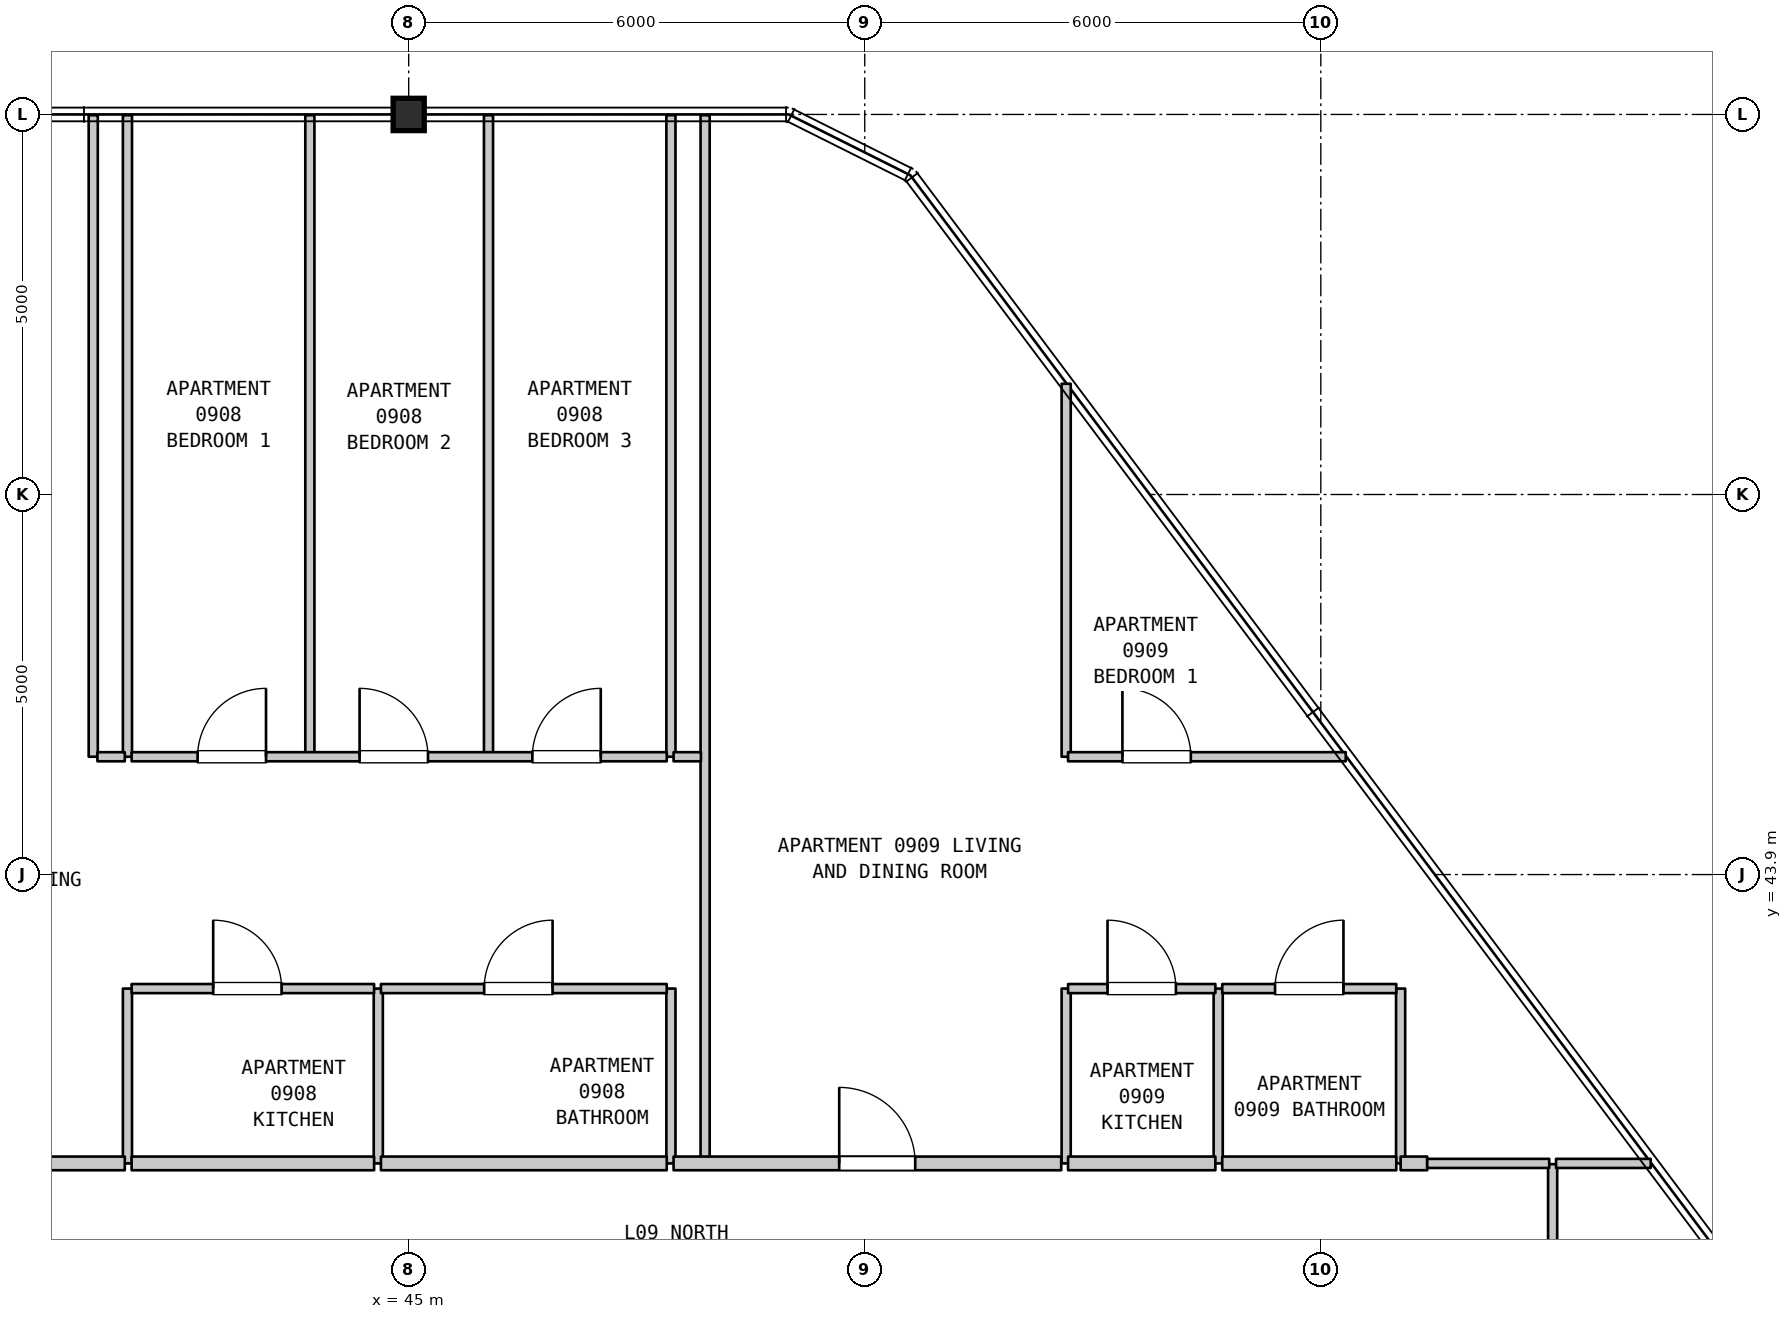
"""IFC4 building model, lengths in metres.
Left out: names, types, materials, properties, quantities, classifications, styles, units other than length and angle.
Written with IfcOpenShell. Run it as: python <this file> out.ifc"""

import sys

from ifc_helpers import new_model, si_unit, direction, frame, frame_2d, origin, origin_2d, place, context, subcontext, project, spatial, rectangle, i_section, extrude, element, fill, save


model = new_model("IFC4")
c1 = context("Model", 3, precision=1e-05, world=origin(), true_north=direction((0.0, 1.0)))
c2 = subcontext(c1, "Body", "Model", "MODEL_VIEW")
j1 = project(units=[si_unit("LENGTHUNIT", "METRE"), si_unit("PLANEANGLEUNIT", "RADIAN")], contexts=[c1])
p1 = place(None, origin())
s1 = spatial("IfcSite", under=j1, at=p1, CompositionType="ELEMENT")
p2 = place(p1, origin())
s2 = spatial("IfcBuilding", under=s1, at=p2, CompositionType="ELEMENT")
p3 = place(p2, frame((0.0, 0.0, 42.5)))
s3 = spatial("IfcBuildingStorey", under=s2, at=p3, CompositionType="ELEMENT", Elevation=42.5)
p4 = place(p3, frame((45.0, 53.9, 0.0), z_axis=(0.0, 0.0, 1.0), x_axis=(1.0, 0.0, 0.0)))
e1 = element("IfcColumn", 1, at=p4, inside=s3, PredefinedType="COLUMN", context=c2, shape_type="SweptSolid", body=[
    extrude(i_section(OverallWidth=0.409, OverallDepth=0.425, WebThickness=0.032, FlangeThickness=0.052, FilletRadius=0.015, at=origin_2d()), origin(), (0.0, 0.0, 1.0), 3.7),
])
p5 = place(p3, frame((40.85, 45.45, 0.0), z_axis=(0.0, 0.0, 1.0), x_axis=(0.0, 1.0, 0.0)))
e2 = element("IfcWall", 2, at=p5, inside=s3, PredefinedType="PARTITIONING", context=c2, shape_type="SweptSolid", body=[
    extrude(rectangle(XDim=8.44, YDim=0.12, at=frame_2d((4.22, 0.0))), origin(), (0.0, 0.0, 1.0), 3.385),
])
p6 = place(p3, frame((41.3, 40.1, 0.0), z_axis=(0.0, 0.0, 1.0), x_axis=(0.0, 1.0, 0.0)))
e3 = element("IfcWall", 3, at=p6, inside=s3, PredefinedType="PARTITIONING", context=c2, shape_type="SweptSolid", body=[
    extrude(rectangle(XDim=2.3, YDim=0.12, at=frame_2d((1.15, 0.0))), origin(), (0.0, 0.0, 1.0), 3.385),
])
for number, where, z_axis, x_axis in (
    (4, (41.3, 45.45, 0.0), (0.0, 0.0, 1.0), (0.0, 1.0, 0.0)),
    (5, (43.7, 45.45, 0.0), (0.0, 0.0, 1.0), (0.0, 1.0, 0.0)),
):
    element("IfcWall", number, at=place(p3, frame(where, z_axis=z_axis, x_axis=x_axis)), inside=s3, PredefinedType="PARTITIONING", context=c2, shape_type="SweptSolid", body=[
        extrude(rectangle(XDim=8.44, YDim=0.12, at=frame_2d((4.22, 0.0))), origin(), (0.0, 0.0, 1.0), 3.385),
    ])
p7 = place(p3, frame((44.6, 40.1, 0.0), z_axis=(0.0, 0.0, 1.0), x_axis=(0.0, 1.0, 0.0)))
e6 = element("IfcWall", 6, at=p7, inside=s3, PredefinedType="PARTITIONING", context=c2, shape_type="SweptSolid", body=[
    extrude(rectangle(XDim=2.3, YDim=0.12, at=frame_2d((1.15, 0.0))), origin(), (0.0, 0.0, 1.0), 3.385),
])
p8 = place(p3, frame((46.05, 45.45, 0.0), z_axis=(0.0, 0.0, 1.0), x_axis=(0.0, 1.0, 0.0)))
e7 = element("IfcWall", 7, at=p8, inside=s3, PredefinedType="PARTITIONING", context=c2, shape_type="SweptSolid", body=[
    extrude(rectangle(XDim=8.44, YDim=0.12, at=frame_2d((4.22, 0.0))), origin(), (0.0, 0.0, 1.0), 3.385),
])
p9 = place(p3, frame((48.45, 40.1, 0.0), z_axis=(0.0, 0.0, 1.0), x_axis=(0.0, 1.0, 0.0)))
e8 = element("IfcWall", 8, at=p9, inside=s3, PredefinedType="PARTITIONING", context=c2, shape_type="SweptSolid", body=[
    extrude(rectangle(XDim=2.3, YDim=0.12, at=frame_2d((1.15, 0.0))), origin(), (0.0, 0.0, 1.0), 3.385),
])
p10 = place(p3, frame((48.45, 45.45, 0.0), z_axis=(0.0, 0.0, 1.0), x_axis=(0.0, 1.0, 0.0)))
e9 = element("IfcWall", 9, at=p10, inside=s3, PredefinedType="PARTITIONING", context=c2, shape_type="SweptSolid", body=[
    extrude(rectangle(XDim=8.44, YDim=0.12, at=frame_2d((4.22, 0.0))), origin(), (0.0, 0.0, 1.0), 3.385),
])
p11 = place(p3, frame((48.9, 40.1, 0.0), z_axis=(0.0, 0.0, 1.0), x_axis=(0.0, 1.0, 0.0)))
e10 = element("IfcWall", 10, at=p11, inside=s3, PredefinedType="PARTITIONING", context=c2, shape_type="SweptSolid", body=[
    extrude(rectangle(XDim=13.79, YDim=0.12, at=frame_2d((6.895, 0.0))), origin(), (0.0, 0.0, 1.0), 3.385),
])
p12 = place(p3, frame((53.65, 40.1, 0.0), z_axis=(0.0, 0.0, 1.0), x_axis=(0.0, 1.0, 0.0)))
e11 = element("IfcWall", 11, at=p12, inside=s3, PredefinedType="PARTITIONING", context=c2, shape_type="SweptSolid", body=[
    extrude(rectangle(XDim=2.3, YDim=0.12, at=frame_2d((1.15, 0.0))), origin(), (0.0, 0.0, 1.0), 3.385),
])
p13 = place(p3, frame((53.65, 45.45, 0.0), z_axis=(0.0, 0.0, 1.0), x_axis=(0.0, 1.0, 0.0)))
e12 = element("IfcWall", 12, at=p13, inside=s3, PredefinedType="PARTITIONING", context=c2, shape_type="SweptSolid", body=[
    extrude(rectangle(XDim=4.907, YDim=0.12, at=frame_2d((2.454, 0.0))), origin(), (0.0, 0.0, 1.0), 3.385),
])
for number, where, z_axis, x_axis in (
    (13, (55.65, 40.1, 0.0), (0.0, 0.0, 1.0), (0.0, 1.0, 0.0)),
    (14, (58.05, 40.1, 0.0), (0.0, 0.0, 1.0), (0.0, 1.0, 0.0)),
):
    element("IfcWall", number, at=place(p3, frame(where, z_axis=z_axis, x_axis=x_axis)), inside=s3, PredefinedType="PARTITIONING", context=c2, shape_type="SweptSolid", body=[
        extrude(rectangle(XDim=2.3, YDim=0.12, at=frame_2d((1.15, 0.0))), origin(), (0.0, 0.0, 1.0), 3.385),
    ])
p14 = place(p3, frame((60.05, 37.89, 0.0), z_axis=(0.0, 0.0, 1.0), x_axis=(0.0, 1.0, 0.0)))
e15 = element("IfcWall", 15, at=p14, inside=s3, PredefinedType="PARTITIONING", context=c2, shape_type="SweptSolid", body=[
    extrude(rectangle(XDim=2.2, YDim=0.12, at=frame_2d((1.1, 0.0))), origin(), (0.0, 0.0, 1.0), 3.385),
])
p15 = place(p3, frame((36.125, 40.1, 0.0), z_axis=(0.0, 0.0, 1.0), x_axis=(1.0, 0.0, 0.0)))
e16 = element("IfcWall", 16, at=p15, inside=s3, PredefinedType="STANDARD", context=c2, shape_type="SweptSolid", body=[
    extrude(rectangle(XDim=5.14, YDim=0.18, at=frame_2d((2.57, 0.0))), origin(), (0.0, 0.0, 1.0), 3.385),
])
p16 = place(p15, frame((2.198, 0.0, 0.0)))
e17 = element("IfcOpeningElement", 17, at=p16, cuts=e16, PredefinedType="OPENING", context=c2, shape_type="SweptSolid", body=[
    extrude(rectangle(XDim=1.0, YDim=2.15, at=frame_2d((0.5, 1.075))), frame((0.0, 0.1, 0.0), z_axis=(0.0, -1.0, 0.0), x_axis=(1.0, 0.0, 0.0)), (0.0, 0.0, 1.0), 0.2),
])
p17 = place(p3, frame((41.355, 40.1, 0.0), z_axis=(0.0, 0.0, 1.0), x_axis=(1.0, 0.0, 0.0)))
e18 = element("IfcWall", 18, at=p17, inside=s3, PredefinedType="STANDARD", context=c2, shape_type="SweptSolid", body=[
    extrude(rectangle(XDim=3.19, YDim=0.18, at=frame_2d((1.595, 0.0))), origin(), (0.0, 0.0, 1.0), 3.385),
])
p18 = place(p3, frame((44.635, 40.1, 0.0), z_axis=(0.0, 0.0, 1.0), x_axis=(1.0, 0.0, 0.0)))
e19 = element("IfcWall", 19, at=p18, inside=s3, PredefinedType="STANDARD", context=c2, shape_type="SweptSolid", body=[
    extrude(rectangle(XDim=3.76, YDim=0.18, at=frame_2d((1.88, 0.0))), origin(), (0.0, 0.0, 1.0), 3.385),
])
p19 = place(p3, frame((48.485, 40.1, 0.0), z_axis=(0.0, 0.0, 1.0), x_axis=(1.0, 0.0, 0.0)))
e20 = element("IfcWall", 20, at=p19, inside=s3, PredefinedType="STANDARD", context=c2, shape_type="SweptSolid", body=[
    extrude(rectangle(XDim=5.1, YDim=0.18, at=frame_2d((2.55, 0.0))), origin(), (0.0, 0.0, 1.0), 3.385),
])
p20 = place(p19, frame((2.179, 0.0, 0.0)))
e21 = element("IfcOpeningElement", 21, at=p20, cuts=e20, PredefinedType="OPENING", context=c2, shape_type="SweptSolid", body=[
    extrude(rectangle(XDim=1.0, YDim=2.15, at=frame_2d((0.5, 1.075))), frame((0.0, 0.1, 0.0), z_axis=(0.0, -1.0, 0.0), x_axis=(1.0, 0.0, 0.0)), (0.0, 0.0, 1.0), 0.2),
])
p21 = place(p3, frame((53.675, 40.1, 0.0), z_axis=(0.0, 0.0, 1.0), x_axis=(1.0, 0.0, 0.0)))
e22 = element("IfcWall", 22, at=p21, inside=s3, PredefinedType="STANDARD", context=c2, shape_type="SweptSolid", body=[
    extrude(rectangle(XDim=1.938, YDim=0.18, at=frame_2d((0.969, 0.0))), origin(), (0.0, 0.0, 1.0), 3.385),
])
p22 = place(p3, frame((55.703, 40.1, 0.0), z_axis=(0.0, 0.0, 1.0), x_axis=(1.0, 0.0, 0.0)))
e23 = element("IfcWall", 23, at=p22, inside=s3, PredefinedType="STANDARD", context=c2, shape_type="SweptSolid", body=[
    extrude(rectangle(XDim=2.29, YDim=0.18, at=frame_2d((1.145, 0.0))), origin(), (0.0, 0.0, 1.0), 3.385),
])
p23 = place(p3, frame((58.05, 40.1, 0.0), z_axis=(0.0, 0.0, 1.0), x_axis=(1.0, 0.0, 0.0)))
e24 = element("IfcWall", 24, at=p23, inside=s3, PredefinedType="STANDARD", context=c2, shape_type="SweptSolid", body=[
    extrude(rectangle(XDim=0.35, YDim=0.18, at=frame_2d((0.175, 0.0))), origin(), (0.0, 0.0, 1.0), 3.385),
])
p24 = place(p3, frame((58.4, 40.1, 0.0), z_axis=(0.0, 0.0, 1.0), x_axis=(1.0, 0.0, 0.0)))
e25 = element("IfcWall", 25, at=p24, inside=s3, PredefinedType="PARTITIONING", context=c2, shape_type="SweptSolid", body=[
    extrude(rectangle(XDim=1.605, YDim=0.12, at=frame_2d((0.802, 0.0))), origin(), (0.0, 0.0, 1.0), 3.385),
])
p25 = place(p3, frame((60.095, 40.1, 0.0), z_axis=(0.0, 0.0, 1.0), x_axis=(1.0, 0.0, 0.0)))
e26 = element("IfcWall", 26, at=p25, inside=s3, PredefinedType="PARTITIONING", context=c2, shape_type="SweptSolid", body=[
    extrude(rectangle(XDim=1.245, YDim=0.12, at=frame_2d((0.623, 0.0))), origin(), (0.0, 0.0, 1.0), 3.385),
])
p26 = place(p3, frame((41.355, 42.4, 0.0), z_axis=(0.0, 0.0, 1.0), x_axis=(1.0, 0.0, 0.0)))
e27 = element("IfcWall", 27, at=p26, inside=s3, PredefinedType="PARTITIONING", context=c2, shape_type="SweptSolid", body=[
    extrude(rectangle(XDim=3.19, YDim=0.12, at=frame_2d((1.595, 0.0))), origin(), (0.0, 0.0, 1.0), 3.385),
])
p27 = place(p26, frame((1.073, 0.0, 0.0)))
e28 = element("IfcOpeningElement", 28, at=p27, cuts=e27, PredefinedType="OPENING", context=c2, shape_type="SweptSolid", body=[
    extrude(rectangle(XDim=0.9, YDim=2.15, at=frame_2d((0.45, 1.075))), frame((0.0, 0.07, 0.0), z_axis=(0.0, -1.0, 0.0), x_axis=(1.0, 0.0, 0.0)), (0.0, 0.0, 1.0), 0.14),
])
p28 = place(p3, frame((44.635, 42.4, 0.0), z_axis=(0.0, 0.0, 1.0), x_axis=(1.0, 0.0, 0.0)))
e29 = element("IfcWall", 29, at=p28, inside=s3, PredefinedType="PARTITIONING", context=c2, shape_type="SweptSolid", body=[
    extrude(rectangle(XDim=3.76, YDim=0.12, at=frame_2d((1.88, 0.0))), origin(), (0.0, 0.0, 1.0), 3.385),
])
p29 = place(p28, frame((1.358, 0.0, 0.0)))
e30 = element("IfcOpeningElement", 30, at=p29, cuts=e29, PredefinedType="OPENING", context=c2, shape_type="SweptSolid", body=[
    extrude(rectangle(XDim=0.9, YDim=2.1, at=frame_2d((0.45, 1.05))), frame((0.0, 0.07, 0.0), z_axis=(0.0, -1.0, 0.0), x_axis=(1.0, 0.0, 0.0)), (0.0, 0.0, 1.0), 0.14),
])
p30 = place(p3, frame((53.675, 42.4, 0.0), z_axis=(0.0, 0.0, 1.0), x_axis=(1.0, 0.0, 0.0)))
e31 = element("IfcWall", 31, at=p30, inside=s3, PredefinedType="PARTITIONING", context=c2, shape_type="SweptSolid", body=[
    extrude(rectangle(XDim=1.938, YDim=0.12, at=frame_2d((0.969, 0.0))), origin(), (0.0, 0.0, 1.0), 3.385),
])
p31 = place(p30, frame((0.519, 0.0, 0.0)))
e32 = element("IfcOpeningElement", 32, at=p31, cuts=e31, PredefinedType="OPENING", context=c2, shape_type="SweptSolid", body=[
    extrude(rectangle(XDim=0.9, YDim=2.15, at=frame_2d((0.45, 1.075))), frame((0.0, 0.07, 0.0), z_axis=(0.0, -1.0, 0.0), x_axis=(1.0, 0.0, 0.0)), (0.0, 0.0, 1.0), 0.14),
])
p32 = place(p3, frame((55.703, 42.4, 0.0), z_axis=(0.0, 0.0, 1.0), x_axis=(1.0, 0.0, 0.0)))
e33 = element("IfcWall", 33, at=p32, inside=s3, PredefinedType="PARTITIONING", context=c2, shape_type="SweptSolid", body=[
    extrude(rectangle(XDim=2.29, YDim=0.12, at=frame_2d((1.145, 0.0))), origin(), (0.0, 0.0, 1.0), 3.385),
])
p33 = place(p32, frame((0.695, 0.0, 0.0)))
e34 = element("IfcOpeningElement", 34, at=p33, cuts=e33, PredefinedType="OPENING", context=c2, shape_type="SweptSolid", body=[
    extrude(rectangle(XDim=0.9, YDim=2.1, at=frame_2d((0.45, 1.05))), frame((0.0, 0.07, 0.0), z_axis=(0.0, -1.0, 0.0), x_axis=(1.0, 0.0, 0.0)), (0.0, 0.0, 1.0), 0.14),
])
p34 = place(p3, frame((40.905, 45.45, 0.0), z_axis=(0.0, 0.0, 1.0), x_axis=(1.0, 0.0, 0.0)))
e35 = element("IfcWall", 35, at=p34, inside=s3, PredefinedType="PARTITIONING", context=c2, shape_type="SweptSolid", body=[
    extrude(rectangle(XDim=0.36, YDim=0.12, at=frame_2d((0.18, 0.0))), origin(), (0.0, 0.0, 1.0), 3.385),
])
p35 = place(p3, frame((41.355, 45.45, 0.0), z_axis=(0.0, 0.0, 1.0), x_axis=(1.0, 0.0, 0.0)))
e36 = element("IfcWall", 36, at=p35, inside=s3, PredefinedType="PARTITIONING", context=c2, shape_type="SweptSolid", body=[
    extrude(rectangle(XDim=7.04, YDim=0.12, at=frame_2d((3.52, 0.0))), origin(), (0.0, 0.0, 1.0), 3.385),
])
p36 = place(p35, frame((0.868, 0.0, 0.0)))
e37 = element("IfcOpeningElement", 37, at=p36, cuts=e36, PredefinedType="OPENING", context=c2, shape_type="SweptSolid", body=[
    extrude(rectangle(XDim=0.9, YDim=2.15, at=frame_2d((0.45, 1.075))), frame((0.0, 0.07, 0.0), z_axis=(0.0, -1.0, 0.0), x_axis=(1.0, 0.0, 0.0)), (0.0, 0.0, 1.0), 0.14),
])
p37 = place(p35, frame((2.999, 0.0, 0.0)))
e38 = element("IfcOpeningElement", 38, at=p37, cuts=e36, PredefinedType="OPENING", context=c2, shape_type="SweptSolid", body=[
    extrude(rectangle(XDim=0.9, YDim=2.15, at=frame_2d((0.45, 1.075))), frame((0.0, 0.07, 0.0), z_axis=(0.0, -1.0, 0.0), x_axis=(1.0, 0.0, 0.0)), (0.0, 0.0, 1.0), 0.14),
])
p38 = place(p35, frame((5.272, 0.0, 0.0)))
e39 = element("IfcOpeningElement", 39, at=p38, cuts=e36, PredefinedType="OPENING", context=c2, shape_type="SweptSolid", body=[
    extrude(rectangle(XDim=0.9, YDim=2.15, at=frame_2d((0.45, 1.075))), frame((0.0, 0.07, 0.0), z_axis=(0.0, -1.0, 0.0), x_axis=(1.0, 0.0, 0.0)), (0.0, 0.0, 1.0), 0.14),
])
p39 = place(p3, frame((48.485, 45.45, 0.0), z_axis=(0.0, 0.0, 1.0), x_axis=(1.0, 0.0, 0.0)))
e40 = element("IfcWall", 40, at=p39, inside=s3, PredefinedType="PARTITIONING", context=c2, shape_type="SweptSolid", body=[
    extrude(rectangle(XDim=0.36, YDim=0.12, at=frame_2d((0.18, 0.0))), origin(), (0.0, 0.0, 1.0), 3.385),
])
p40 = place(p3, frame((53.675, 45.45, 0.0), z_axis=(0.0, 0.0, 1.0), x_axis=(1.0, 0.0, 0.0)))
e41 = element("IfcWall", 41, at=p40, inside=s3, PredefinedType="PARTITIONING", context=c2, shape_type="SweptSolid", body=[
    extrude(rectangle(XDim=3.653, YDim=0.12, at=frame_2d((1.826, 0.0))), origin(), (0.0, 0.0, 1.0), 3.385),
])
p41 = place(p40, frame((0.715, 0.0, 0.0)))
e42 = element("IfcOpeningElement", 42, at=p41, cuts=e41, PredefinedType="OPENING", context=c2, shape_type="SweptSolid", body=[
    extrude(rectangle(XDim=0.9, YDim=2.15, at=frame_2d((0.45, 1.075))), frame((0.0, 0.07, 0.0), z_axis=(0.0, -1.0, 0.0), x_axis=(1.0, 0.0, 0.0)), (0.0, 0.0, 1.0), 0.14),
])
p42 = place(p20, origin())
e43 = element("IfcDoor", 43, at=p42, inside=s3, OperationType="SINGLE_SWING_LEFT", PredefinedType="DOOR", context=c2, shape_type="SweptSolid", body=[
    extrude(rectangle(XDim=1.0, YDim=2.15, at=frame_2d((0.5, 1.075))), frame((0.0, 0.025, 0.0), z_axis=(0.0, -1.0, 0.0), x_axis=(1.0, 0.0, 0.0)), (0.0, 0.0, 1.0), 0.05),
])
fill(e21, e43)
p43 = place(p27, origin())
e44 = element("IfcDoor", 44, at=p43, inside=s3, OperationType="SINGLE_SWING_LEFT", PredefinedType="DOOR", context=c2, shape_type="SweptSolid", body=[
    extrude(rectangle(XDim=0.9, YDim=2.15, at=frame_2d((0.45, 1.075))), frame((0.0, 0.025, 0.0), z_axis=(0.0, -1.0, 0.0), x_axis=(1.0, 0.0, 0.0)), (0.0, 0.0, 1.0), 0.05),
])
fill(e28, e44)
p44 = place(p29, origin())
e45 = element("IfcDoor", 45, at=p44, inside=s3, OperationType="SINGLE_SWING_RIGHT", PredefinedType="DOOR", context=c2, shape_type="SweptSolid", body=[
    extrude(rectangle(XDim=0.9, YDim=2.1, at=frame_2d((0.45, 1.05))), frame((0.0, 0.025, 0.0), z_axis=(0.0, -1.0, 0.0), x_axis=(1.0, 0.0, 0.0)), (0.0, 0.0, 1.0), 0.05),
])
fill(e30, e45)
p45 = place(p31, origin())
e46 = element("IfcDoor", 46, at=p45, inside=s3, OperationType="SINGLE_SWING_LEFT", PredefinedType="DOOR", context=c2, shape_type="SweptSolid", body=[
    extrude(rectangle(XDim=0.9, YDim=2.15, at=frame_2d((0.45, 1.075))), frame((0.0, 0.025, 0.0), z_axis=(0.0, -1.0, 0.0), x_axis=(1.0, 0.0, 0.0)), (0.0, 0.0, 1.0), 0.05),
])
fill(e32, e46)
p46 = place(p33, origin())
e47 = element("IfcDoor", 47, at=p46, inside=s3, OperationType="SINGLE_SWING_RIGHT", PredefinedType="DOOR", context=c2, shape_type="SweptSolid", body=[
    extrude(rectangle(XDim=0.9, YDim=2.1, at=frame_2d((0.45, 1.05))), frame((0.0, 0.025, 0.0), z_axis=(0.0, -1.0, 0.0), x_axis=(1.0, 0.0, 0.0)), (0.0, 0.0, 1.0), 0.05),
])
fill(e34, e47)
p47 = place(p36, origin())
e48 = element("IfcDoor", 48, at=p47, inside=s3, OperationType="SINGLE_SWING_RIGHT", PredefinedType="DOOR", context=c2, shape_type="SweptSolid", body=[
    extrude(rectangle(XDim=0.9, YDim=2.15, at=frame_2d((0.45, 1.075))), frame((0.0, 0.025, 0.0), z_axis=(0.0, -1.0, 0.0), x_axis=(1.0, 0.0, 0.0)), (0.0, 0.0, 1.0), 0.05),
])
fill(e37, e48)
p48 = place(p37, origin())
e49 = element("IfcDoor", 49, at=p48, inside=s3, OperationType="SINGLE_SWING_LEFT", PredefinedType="DOOR", context=c2, shape_type="SweptSolid", body=[
    extrude(rectangle(XDim=0.9, YDim=2.15, at=frame_2d((0.45, 1.075))), frame((0.0, 0.025, 0.0), z_axis=(0.0, -1.0, 0.0), x_axis=(1.0, 0.0, 0.0)), (0.0, 0.0, 1.0), 0.05),
])
fill(e38, e49)
p49 = place(p38, origin())
e50 = element("IfcDoor", 50, at=p49, inside=s3, OperationType="SINGLE_SWING_RIGHT", PredefinedType="DOOR", context=c2, shape_type="SweptSolid", body=[
    extrude(rectangle(XDim=0.9, YDim=2.15, at=frame_2d((0.45, 1.075))), frame((0.0, 0.025, 0.0), z_axis=(0.0, -1.0, 0.0), x_axis=(1.0, 0.0, 0.0)), (0.0, 0.0, 1.0), 0.05),
])
fill(e39, e50)
p50 = place(p41, origin())
e51 = element("IfcDoor", 51, at=p50, inside=s3, OperationType="SINGLE_SWING_LEFT", PredefinedType="DOOR", context=c2, shape_type="SweptSolid", body=[
    extrude(rectangle(XDim=0.9, YDim=2.15, at=frame_2d((0.45, 1.075))), frame((0.0, 0.025, 0.0), z_axis=(0.0, -1.0, 0.0), x_axis=(1.0, 0.0, 0.0)), (0.0, 0.0, 1.0), 0.05),
])
fill(e42, e51)
save(model, sys.argv[1])
